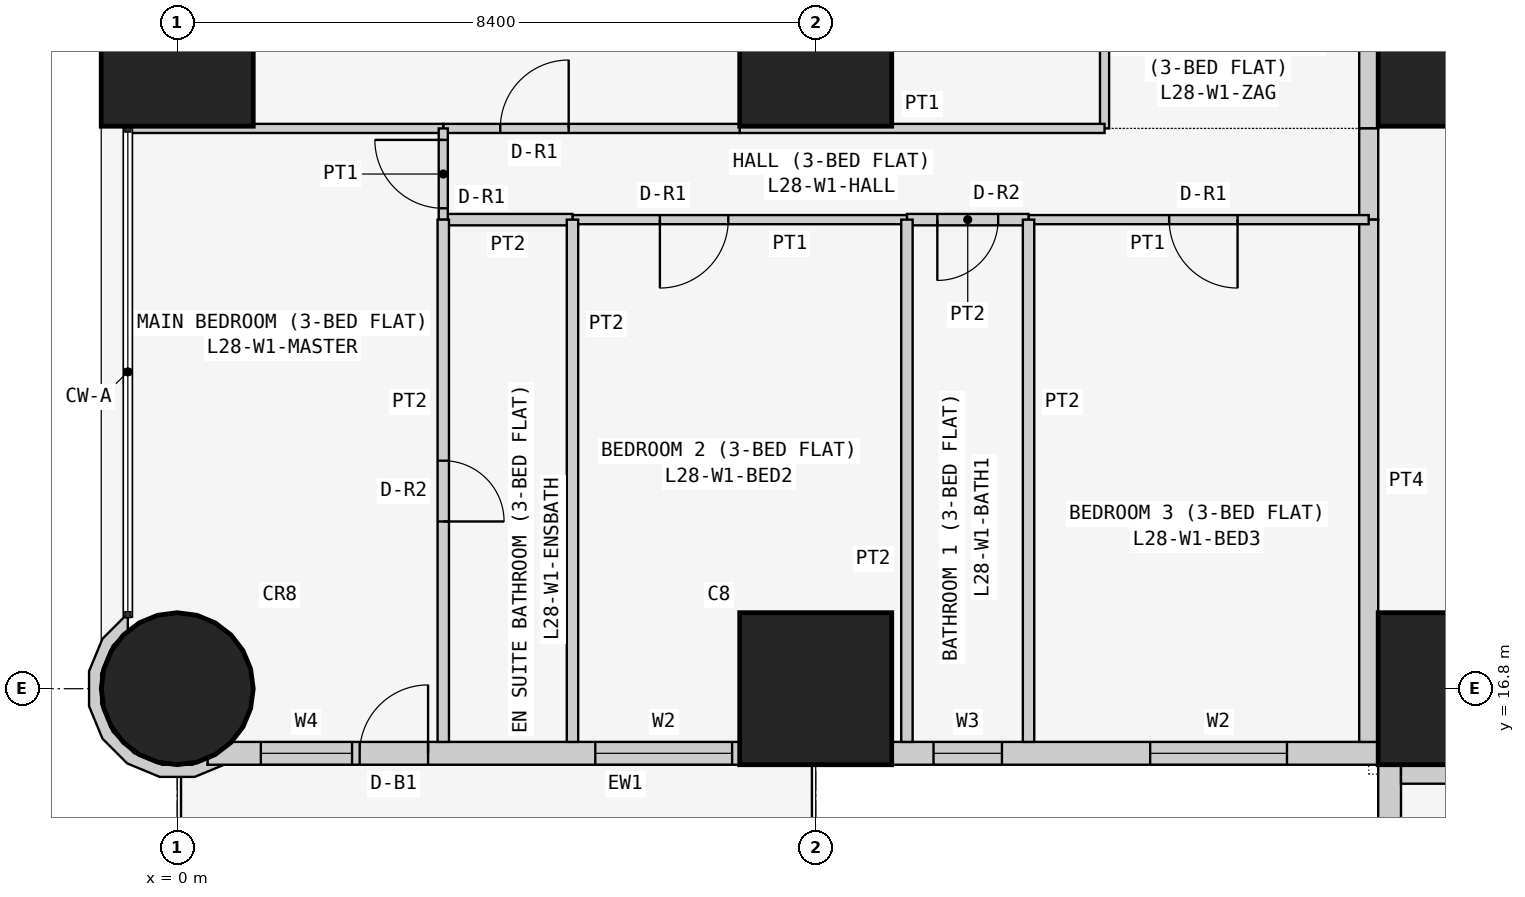
"""IFC4 building model, lengths in metres.
Left out: names, types, materials, properties, quantities, classifications, styles, units other than length and angle.
Written with IfcOpenShell. Run it as: python <this file> out.ifc"""

import sys

from ifc_helpers import new_model, si_unit, direction, frame, frame_2d, origin, origin_2d, place, context, subcontext, project, spatial, polyline, rectangle, circle, outline, extrude, element, fill, save


model = new_model("IFC4")
c1 = context("Model", 3, precision=1e-05, world=origin(), true_north=direction((0.0, 1.0)))
c2 = subcontext(c1, "Body", "Model", "MODEL_VIEW")
j1 = project(units=[si_unit("LENGTHUNIT", "METRE"), si_unit("PLANEANGLEUNIT", "RADIAN")], contexts=[c1])
p1 = place(None, origin())
s1 = spatial("IfcSite", under=j1, at=p1, CompositionType="ELEMENT")
p2 = place(p1, origin())
s2 = spatial("IfcBuilding", under=s1, at=p2, CompositionType="ELEMENT")
p3 = place(p2, frame((0.0, 0.0, 112.5)))
s3 = spatial("IfcBuildingStorey", under=s2, at=p3, CompositionType="ELEMENT", Elevation=112.5)
p4 = place(p3, frame((0.0, 16.8, 0.0), z_axis=(0.0, 0.0, 1.0), x_axis=(1.0, 0.0, 0.0)))
e1 = element("IfcColumn", 1, at=p4, inside=s3, PredefinedType="COLUMN", context=c2, shape_type="SweptSolid", body=[
    extrude(circle(Radius=1.0, at=origin_2d()), origin(), (0.0, 0.0, 1.0), 3.6),
])
for number, where, z_axis, x_axis in (
    (2, (0.0, 25.2, 0.0), (0.0, 0.0, 1.0), (1.0, 0.0, 0.0)),
    (3, (8.4, 16.8, 0.0), (0.0, 0.0, 1.0), (1.0, 0.0, 0.0)),
    (4, (8.4, 25.2, 0.0), (0.0, 0.0, 1.0), (1.0, 0.0, 0.0)),
    (5, (16.8, 16.8, 0.0), (0.0, 0.0, 1.0), (1.0, 0.0, 0.0)),
    (6, (16.8, 25.2, 0.0), (0.0, 0.0, 1.0), (1.0, 0.0, 0.0)),
):
    element("IfcColumn", number, at=place(p3, frame(where, z_axis=z_axis, x_axis=x_axis)), inside=s3, PredefinedType="COLUMN", context=c2, shape_type="SweptSolid", body=[
        extrude(rectangle(XDim=2.0, YDim=2.0, at=origin_2d()), origin(), (0.0, 0.0, 1.0), 3.6),
    ])
p5 = place(p3, frame((0.4, 15.95, 0.0), z_axis=(0.0, 0.0, 1.0), x_axis=(1.0, 0.0, 0.0)))
e7 = element("IfcWall", 7, at=p5, inside=s3, PredefinedType="SOLIDWALL", context=c2, shape_type="SweptSolid", body=[
    extrude(rectangle(XDim=15.7, YDim=0.3, at=frame_2d((7.85, 0.0))), origin(), (0.0, 0.0, 1.0), 3.45),
])
p6 = place(p5, frame((12.4, 0.0, 0.9)))
e8 = element("IfcOpeningElement", 8, at=p6, cuts=e7, PredefinedType="OPENING", context=c2, shape_type="SweptSolid", body=[
    extrude(rectangle(XDim=1.8, YDim=1.5, at=frame_2d((0.9, 0.75))), frame((0.0, 0.16, 0.0), z_axis=(0.0, -1.0, 0.0), x_axis=(1.0, 0.0, 0.0)), (0.0, 0.0, 1.0), 0.32),
])
p7 = place(p5, frame((9.55, 0.0, 1.5)))
e9 = element("IfcOpeningElement", 9, at=p7, cuts=e7, PredefinedType="OPENING", context=c2, shape_type="SweptSolid", body=[
    extrude(rectangle(XDim=0.9, YDim=0.7, at=frame_2d((0.45, 0.35))), frame((0.0, 0.16, 0.0), z_axis=(0.0, -1.0, 0.0), x_axis=(1.0, 0.0, 0.0)), (0.0, 0.0, 1.0), 0.32),
])
p8 = place(p5, frame((5.1, 0.0, 0.9)))
e10 = element("IfcOpeningElement", 10, at=p8, cuts=e7, PredefinedType="OPENING", context=c2, shape_type="SweptSolid", body=[
    extrude(rectangle(XDim=1.8, YDim=1.5, at=frame_2d((0.9, 0.75))), frame((0.0, 0.16, 0.0), z_axis=(0.0, -1.0, 0.0), x_axis=(1.0, 0.0, 0.0)), (0.0, 0.0, 1.0), 0.32),
])
p9 = place(p5, frame((2.0, 0.0, 0.0)))
e11 = element("IfcOpeningElement", 11, at=p9, cuts=e7, PredefinedType="OPENING", context=c2, shape_type="SweptSolid", body=[
    extrude(rectangle(XDim=0.9, YDim=2.4, at=frame_2d((0.45, 1.2))), frame((0.0, 0.16, 0.0), z_axis=(0.0, -1.0, 0.0), x_axis=(1.0, 0.0, 0.0)), (0.0, 0.0, 1.0), 0.32),
])
p10 = place(p5, frame((0.7, 0.0, 0.9)))
e12 = element("IfcOpeningElement", 12, at=p10, cuts=e7, PredefinedType="OPENING", context=c2, shape_type="SweptSolid", body=[
    extrude(rectangle(XDim=1.2, YDim=1.5, at=frame_2d((0.6, 0.75))), frame((0.0, 0.16, 0.0), z_axis=(0.0, -1.0, 0.0), x_axis=(1.0, 0.0, 0.0)), (0.0, 0.0, 1.0), 0.32),
])
p11 = place(p3, frame((15.95, 15.8, 0.0), z_axis=(0.0, 0.0, 1.0), x_axis=(0.0, -1.0, 0.0)))
e13 = element("IfcWall", 13, at=p11, inside=s3, PredefinedType="SOLIDWALL", context=c2, shape_type="SweptSolid", body=[
    extrude(rectangle(XDim=7.0, YDim=0.3, at=frame_2d((3.5, 0.0))), origin(), (0.0, 0.0, 1.0), 3.45),
])
p12 = place(p11, frame((1.5, 0.0, 0.9)))
e14 = element("IfcOpeningElement", 14, at=p12, cuts=e13, PredefinedType="OPENING", context=c2, shape_type="SweptSolid", body=[
    extrude(rectangle(XDim=2.4, YDim=1.5, at=frame_2d((1.2, 0.75))), frame((0.0, 0.16, 0.0), z_axis=(0.0, -1.0, 0.0), x_axis=(1.0, 0.0, 0.0)), (0.0, 0.0, 1.0), 0.32),
])
p13 = place(p11, frame((5.05, 0.0, 0.9)))
e15 = element("IfcOpeningElement", 15, at=p13, cuts=e13, PredefinedType="OPENING", context=c2, shape_type="SweptSolid", body=[
    extrude(rectangle(XDim=1.2, YDim=1.5, at=frame_2d((0.6, 0.75))), frame((0.0, 0.16, 0.0), z_axis=(0.0, -1.0, 0.0), x_axis=(1.0, 0.0, 0.0)), (0.0, 0.0, 1.0), 0.32),
])
p14 = place(p3, frame((-0.643, 17.668, 0.0), z_axis=(0.0, 0.0, 1.0), x_axis=(-0.831199417842, -0.555974394895, 0.0)))
e16 = element("IfcWall", 16, at=p14, inside=s3, PredefinedType="SOLIDWALL", context=c2, shape_type="SweptSolid", body=[
    extrude(outline(polyline([(0.171, 2.132), (0.113, 2.066), (0.339, 2.021), (0.67, 1.8), (0.891, 1.469), (0.968, 1.078), (0.89, 0.688), (0.669, 0.357), (0.338, 0.136), (0.062, 0.081), (-0.036, -0.066), (0.005, -0.093), (0.4, -0.014), (0.783, 0.242), (1.04, 0.626), (1.13, 1.078), (1.04, 1.531), (0.784, 1.915), (0.401, 2.171), (-0.009, 2.253), (0.171, 2.132)])), origin(), (0.0, 0.0, 1.0), 3.45),
])
p15 = place(p3, frame((22.571, 15.675, 0.0), z_axis=(0.0, 0.0, 1.0), x_axis=(-1.0, 0.0, 0.0)))
e17 = element("IfcWall", 17, at=p15, inside=s3, PredefinedType="PARTITIONING", context=c2, shape_type="SweptSolid", body=[
    extrude(rectangle(XDim=6.471, YDim=0.25, at=frame_2d((3.235, 0.0))), origin(), (0.0, 0.0, 1.0), 3.45),
])
p16 = place(p3, frame((15.675, 24.171, 0.0), z_axis=(0.0, 0.0, 1.0), x_axis=(0.0, 1.0, 0.0)))
e18 = element("IfcWall", 18, at=p16, inside=s3, PredefinedType="PARTITIONING", context=c2, shape_type="SweptSolid", body=[
    extrude(rectangle(XDim=5.229, YDim=0.25, at=frame_2d((2.615, 0.0))), origin(), (0.0, 0.0, 1.0), 3.45),
])
p17 = place(p16, frame((2.179, 0.0, 0.0)))
e19 = element("IfcOpeningElement", 19, at=p17, cuts=e18, PredefinedType="OPENING", context=c2, shape_type="SweptSolid", body=[
    extrude(rectangle(XDim=1.0, YDim=2.1, at=frame_2d((0.5, 1.05))), frame((0.0, 0.135, 0.0), z_axis=(0.0, -1.0, 0.0), x_axis=(1.0, 0.0, 0.0)), (0.0, 0.0, 1.0), 0.27),
])
p18 = place(p3, frame((15.675, 22.971, 0.0), z_axis=(0.0, 0.0, 1.0), x_axis=(0.0, 1.0, 0.0)))
e20 = element("IfcWall", 20, at=p18, inside=s3, PredefinedType="PARTITIONING", context=c2, shape_type="SweptSolid", body=[
    extrude(rectangle(XDim=1.2, YDim=0.25, at=frame_2d((0.6, 0.0))), origin(), (0.0, 0.0, 1.0), 3.45),
])
p19 = place(p3, frame((15.675, 16.1, 0.0), z_axis=(0.0, 0.0, 1.0), x_axis=(0.0, 1.0, 0.0)))
e21 = element("IfcWall", 21, at=p19, inside=s3, PredefinedType="PARTITIONING", context=c2, shape_type="SweptSolid", body=[
    extrude(rectangle(XDim=6.871, YDim=0.25, at=frame_2d((3.436, 0.0))), origin(), (0.0, 0.0, 1.0), 3.45),
])
p20 = place(p3, frame((12.2, 29.4, 0.0), z_axis=(0.0, 0.0, 1.0), x_axis=(0.0, -1.0, 0.0)))
e22 = element("IfcWall", 22, at=p20, inside=s3, PredefinedType="PARTITIONING", context=c2, shape_type="SweptSolid", body=[
    extrude(rectangle(XDim=5.229, YDim=0.12, at=frame_2d((2.615, 0.0))), origin(), (0.0, 0.0, 1.0), 3.45),
])
p21 = place(p20, frame((1.05, 0.0, 0.0)))
e23 = element("IfcOpeningElement", 23, at=p21, cuts=e22, PredefinedType="OPENING", context=c2, shape_type="SweptSolid", body=[
    extrude(rectangle(XDim=0.9, YDim=2.1, at=frame_2d((0.45, 1.05))), frame((0.0, 0.07, 0.0), z_axis=(0.0, -1.0, 0.0), x_axis=(1.0, 0.0, 0.0)), (0.0, 0.0, 1.0), 0.14),
])
p22 = place(p3, frame((7.4, 24.171, 0.0), z_axis=(0.0, 0.0, 1.0), x_axis=(1.0, 0.0, 0.0)))
e24 = element("IfcWall", 24, at=p22, inside=s3, PredefinedType="PARTITIONING", context=c2, shape_type="SweptSolid", body=[
    extrude(rectangle(XDim=4.8, YDim=0.12, at=frame_2d((2.4, 0.0))), origin(), (0.0, 0.0, 1.0), 3.45),
])
p23 = place(p3, frame((3.5, 24.171, 0.0), z_axis=(0.0, 0.0, 1.0), x_axis=(1.0, 0.0, 0.0)))
e25 = element("IfcWall", 25, at=p23, inside=s3, PredefinedType="PARTITIONING", context=c2, shape_type="SweptSolid", body=[
    extrude(rectangle(XDim=3.9, YDim=0.12, at=frame_2d((1.95, 0.0))), origin(), (0.0, 0.0, 1.0), 3.45),
])
p24 = place(p23, frame((0.75, 0.0, 0.0)))
e26 = element("IfcOpeningElement", 26, at=p24, cuts=e25, PredefinedType="OPENING", context=c2, shape_type="SweptSolid", body=[
    extrude(rectangle(XDim=0.9, YDim=2.1, at=frame_2d((0.45, 1.05))), frame((0.0, 0.07, 0.0), z_axis=(0.0, -1.0, 0.0), x_axis=(1.0, 0.0, 0.0)), (0.0, 0.0, 1.0), 0.14),
])
p25 = place(p3, frame((-0.65, 24.171, 0.0), z_axis=(0.0, 0.0, 1.0), x_axis=(1.0, 0.0, 0.0)))
e27 = element("IfcWall", 27, at=p25, inside=s3, PredefinedType="PARTITIONING", context=c2, shape_type="SweptSolid", body=[
    extrude(rectangle(XDim=4.15, YDim=0.12, at=frame_2d((2.075, 0.0))), origin(), (0.0, 0.0, 1.0), 3.45),
])
p26 = place(p3, frame((11.2, 22.971, 0.0), z_axis=(0.0, 0.0, 1.0), x_axis=(1.0, 0.0, 0.0)))
e28 = element("IfcWall", 28, at=p26, inside=s3, PredefinedType="PARTITIONING", context=c2, shape_type="SweptSolid", body=[
    extrude(rectangle(XDim=4.475, YDim=0.12, at=frame_2d((2.238, 0.0))), origin(), (0.0, 0.0, 1.0), 3.45),
])
p27 = place(p26, frame((1.85, 0.0, 0.0)))
e29 = element("IfcOpeningElement", 29, at=p27, cuts=e28, PredefinedType="OPENING", context=c2, shape_type="SweptSolid", body=[
    extrude(rectangle(XDim=0.9, YDim=2.1, at=frame_2d((0.45, 1.05))), frame((0.0, 0.07, 0.0), z_axis=(0.0, -1.0, 0.0), x_axis=(1.0, 0.0, 0.0)), (0.0, 0.0, 1.0), 0.14),
])
p28 = place(p3, frame((9.6, 22.971, 0.0), z_axis=(0.0, 0.0, 1.0), x_axis=(1.0, 0.0, 0.0)))
e30 = element("IfcWall", 30, at=p28, inside=s3, PredefinedType="PARTITIONING", context=c2, shape_type="SweptSolid", body=[
    extrude(rectangle(XDim=1.6, YDim=0.15, at=frame_2d((0.8, 0.0))), origin(), (0.0, 0.0, 1.0), 3.45),
])
p29 = place(p28, frame((0.4, 0.0, 0.0)))
e31 = element("IfcOpeningElement", 31, at=p29, cuts=e30, PredefinedType="OPENING", context=c2, shape_type="SweptSolid", body=[
    extrude(rectangle(XDim=0.8, YDim=2.1, at=frame_2d((0.4, 1.05))), frame((0.0, 0.085, 0.0), z_axis=(0.0, -1.0, 0.0), x_axis=(1.0, 0.0, 0.0)), (0.0, 0.0, 1.0), 0.17),
])
p30 = place(p3, frame((5.2, 22.971, 0.0), z_axis=(0.0, 0.0, 1.0), x_axis=(1.0, 0.0, 0.0)))
e32 = element("IfcWall", 32, at=p30, inside=s3, PredefinedType="PARTITIONING", context=c2, shape_type="SweptSolid", body=[
    extrude(rectangle(XDim=4.4, YDim=0.12, at=frame_2d((2.2, 0.0))), origin(), (0.0, 0.0, 1.0), 3.45),
])
p31 = place(p30, frame((1.15, 0.0, 0.0)))
e33 = element("IfcOpeningElement", 33, at=p31, cuts=e32, PredefinedType="OPENING", context=c2, shape_type="SweptSolid", body=[
    extrude(rectangle(XDim=0.9, YDim=2.1, at=frame_2d((0.45, 1.05))), frame((0.0, 0.07, 0.0), z_axis=(0.0, -1.0, 0.0), x_axis=(1.0, 0.0, 0.0)), (0.0, 0.0, 1.0), 0.14),
])
p32 = place(p3, frame((3.5, 22.971, 0.0), z_axis=(0.0, 0.0, 1.0), x_axis=(1.0, 0.0, 0.0)))
e34 = element("IfcWall", 34, at=p32, inside=s3, PredefinedType="PARTITIONING", context=c2, shape_type="SweptSolid", body=[
    extrude(rectangle(XDim=1.7, YDim=0.15, at=frame_2d((0.85, 0.0))), origin(), (0.0, 0.0, 1.0), 3.45),
])
p33 = place(p3, frame((3.5, 24.171, 0.0), z_axis=(0.0, 0.0, 1.0), x_axis=(0.0, -1.0, 0.0)))
e35 = element("IfcWall", 35, at=p33, inside=s3, PredefinedType="PARTITIONING", context=c2, shape_type="SweptSolid", body=[
    extrude(rectangle(XDim=1.2, YDim=0.12, at=frame_2d((0.6, 0.0))), origin(), (0.0, 0.0, 1.0), 3.45),
])
p34 = place(p33, frame((0.151, 0.0, 0.0)))
e36 = element("IfcOpeningElement", 36, at=p34, cuts=e35, PredefinedType="OPENING", context=c2, shape_type="SweptSolid", body=[
    extrude(rectangle(XDim=0.9, YDim=2.1, at=frame_2d((0.45, 1.05))), frame((0.0, 0.07, 0.0), z_axis=(0.0, -1.0, 0.0), x_axis=(1.0, 0.0, 0.0)), (0.0, 0.0, 1.0), 0.14),
])
for number, where, z_axis, x_axis in (
    (37, (11.2, 22.971, 0.0), (0.0, 0.0, 1.0), (0.0, -1.0, 0.0)),
    (38, (9.6, 22.971, 0.0), (0.0, 0.0, 1.0), (0.0, -1.0, 0.0)),
    (39, (5.2, 22.971, 0.0), (0.0, 0.0, 1.0), (0.0, -1.0, 0.0)),
):
    element("IfcWall", number, at=place(p3, frame(where, z_axis=z_axis, x_axis=x_axis)), inside=s3, PredefinedType="PARTITIONING", context=c2, shape_type="SweptSolid", body=[
        extrude(rectangle(XDim=6.871, YDim=0.15, at=frame_2d((3.436, 0.0))), origin(), (0.0, 0.0, 1.0), 3.45),
    ])
p35 = place(p3, frame((3.5, 22.971, 0.0), z_axis=(0.0, 0.0, 1.0), x_axis=(0.0, -1.0, 0.0)))
e40 = element("IfcWall", 40, at=p35, inside=s3, PredefinedType="PARTITIONING", context=c2, shape_type="SweptSolid", body=[
    extrude(rectangle(XDim=6.871, YDim=0.15, at=frame_2d((3.436, 0.0))), origin(), (0.0, 0.0, 1.0), 3.45),
])
p36 = place(p35, frame((3.171, 0.0, 0.0)))
e41 = element("IfcOpeningElement", 41, at=p36, cuts=e40, PredefinedType="OPENING", context=c2, shape_type="SweptSolid", body=[
    extrude(rectangle(XDim=0.8, YDim=2.1, at=frame_2d((0.4, 1.05))), frame((0.0, 0.085, 0.0), z_axis=(0.0, -1.0, 0.0), x_axis=(1.0, 0.0, 0.0)), (0.0, 0.0, 1.0), 0.17),
])
p37 = place(p6, origin())
e42 = element("IfcWindow", 42, at=p37, inside=s3, PartitioningType="SINGLE_PANEL", PredefinedType="WINDOW", context=c2, shape_type="SweptSolid", body=[
    extrude(rectangle(XDim=1.8, YDim=1.5, at=frame_2d((0.9, 0.75))), frame((0.0, 0.03, 0.0), z_axis=(0.0, -1.0, 0.0), x_axis=(1.0, 0.0, 0.0)), (0.0, 0.0, 1.0), 0.06),
])
fill(e8, e42)
p38 = place(p7, origin())
e43 = element("IfcWindow", 43, at=p38, inside=s3, PartitioningType="SINGLE_PANEL", PredefinedType="WINDOW", context=c2, shape_type="SweptSolid", body=[
    extrude(rectangle(XDim=0.9, YDim=0.7, at=frame_2d((0.45, 0.35))), frame((0.0, 0.03, 0.0), z_axis=(0.0, -1.0, 0.0), x_axis=(1.0, 0.0, 0.0)), (0.0, 0.0, 1.0), 0.06),
])
fill(e9, e43)
p39 = place(p8, origin())
e44 = element("IfcWindow", 44, at=p39, inside=s3, PartitioningType="SINGLE_PANEL", PredefinedType="WINDOW", context=c2, shape_type="SweptSolid", body=[
    extrude(rectangle(XDim=1.8, YDim=1.5, at=frame_2d((0.9, 0.75))), frame((0.0, 0.03, 0.0), z_axis=(0.0, -1.0, 0.0), x_axis=(1.0, 0.0, 0.0)), (0.0, 0.0, 1.0), 0.06),
])
fill(e10, e44)
p40 = place(p9, origin())
e45 = element("IfcDoor", 45, at=p40, inside=s3, OperationType="SINGLE_SWING_RIGHT", PredefinedType="DOOR", context=c2, shape_type="SweptSolid", body=[
    extrude(rectangle(XDim=0.9, YDim=2.4, at=frame_2d((0.45, 1.2))), frame((0.0, 0.025, 0.0), z_axis=(0.0, -1.0, 0.0), x_axis=(1.0, 0.0, 0.0)), (0.0, 0.0, 1.0), 0.05),
])
fill(e11, e45)
p41 = place(p10, origin())
e46 = element("IfcWindow", 46, at=p41, inside=s3, PartitioningType="SINGLE_PANEL", PredefinedType="WINDOW", context=c2, shape_type="SweptSolid", body=[
    extrude(rectangle(XDim=1.2, YDim=1.5, at=frame_2d((0.6, 0.75))), frame((0.0, 0.03, 0.0), z_axis=(0.0, -1.0, 0.0), x_axis=(1.0, 0.0, 0.0)), (0.0, 0.0, 1.0), 0.06),
])
fill(e12, e46)
p42 = place(p24, origin())
e47 = element("IfcDoor", 47, at=p42, inside=s3, OperationType="SINGLE_SWING_RIGHT", PredefinedType="DOOR", context=c2, shape_type="SweptSolid", body=[
    extrude(rectangle(XDim=0.9, YDim=2.1, at=frame_2d((0.45, 1.05))), frame((0.0, 0.025, 0.0), z_axis=(0.0, -1.0, 0.0), x_axis=(1.0, 0.0, 0.0)), (0.0, 0.0, 1.0), 0.05),
])
fill(e26, e47)
p43 = place(p27, frame((0.9, 0.0, 0.0), z_axis=(0.0, 0.0, 1.0), x_axis=(-1.0, 0.0, 0.0)))
e48 = element("IfcDoor", 48, at=p43, inside=s3, OperationType="SINGLE_SWING_LEFT", PredefinedType="DOOR", context=c2, shape_type="SweptSolid", body=[
    extrude(rectangle(XDim=0.9, YDim=2.1, at=frame_2d((0.45, 1.05))), frame((0.0, 0.025, 0.0), z_axis=(0.0, -1.0, 0.0), x_axis=(1.0, 0.0, 0.0)), (0.0, 0.0, 1.0), 0.05),
])
fill(e29, e48)
p44 = place(p29, frame((0.8, 0.0, 0.0), z_axis=(0.0, 0.0, 1.0), x_axis=(-1.0, 0.0, 0.0)))
e49 = element("IfcDoor", 49, at=p44, inside=s3, OperationType="SINGLE_SWING_RIGHT", PredefinedType="DOOR", context=c2, shape_type="SweptSolid", body=[
    extrude(rectangle(XDim=0.8, YDim=2.1, at=frame_2d((0.4, 1.05))), frame((0.0, 0.025, 0.0), z_axis=(0.0, -1.0, 0.0), x_axis=(1.0, 0.0, 0.0)), (0.0, 0.0, 1.0), 0.05),
])
fill(e31, e49)
p45 = place(p31, frame((0.9, 0.0, 0.0), z_axis=(0.0, 0.0, 1.0), x_axis=(-1.0, 0.0, 0.0)))
e50 = element("IfcDoor", 50, at=p45, inside=s3, OperationType="SINGLE_SWING_RIGHT", PredefinedType="DOOR", context=c2, shape_type="SweptSolid", body=[
    extrude(rectangle(XDim=0.9, YDim=2.1, at=frame_2d((0.45, 1.05))), frame((0.0, 0.025, 0.0), z_axis=(0.0, -1.0, 0.0), x_axis=(1.0, 0.0, 0.0)), (0.0, 0.0, 1.0), 0.05),
])
fill(e33, e50)
p46 = place(p34, frame((0.9, 0.0, 0.0), z_axis=(0.0, 0.0, 1.0), x_axis=(-1.0, 0.0, 0.0)))
e51 = element("IfcDoor", 51, at=p46, inside=s3, OperationType="SINGLE_SWING_RIGHT", PredefinedType="DOOR", context=c2, shape_type="SweptSolid", body=[
    extrude(rectangle(XDim=0.9, YDim=2.1, at=frame_2d((0.45, 1.05))), frame((0.0, 0.025, 0.0), z_axis=(0.0, -1.0, 0.0), x_axis=(1.0, 0.0, 0.0)), (0.0, 0.0, 1.0), 0.05),
])
fill(e36, e51)
p47 = place(p36, origin())
e52 = element("IfcDoor", 52, at=p47, inside=s3, OperationType="SINGLE_SWING_RIGHT", PredefinedType="DOOR", context=c2, shape_type="SweptSolid", body=[
    extrude(rectangle(XDim=0.8, YDim=2.1, at=frame_2d((0.4, 1.05))), frame((0.0, 0.025, 0.0), z_axis=(0.0, -1.0, 0.0), x_axis=(1.0, 0.0, 0.0)), (0.0, 0.0, 1.0), 0.05),
])
fill(e41, e52)
save(model, sys.argv[1])
